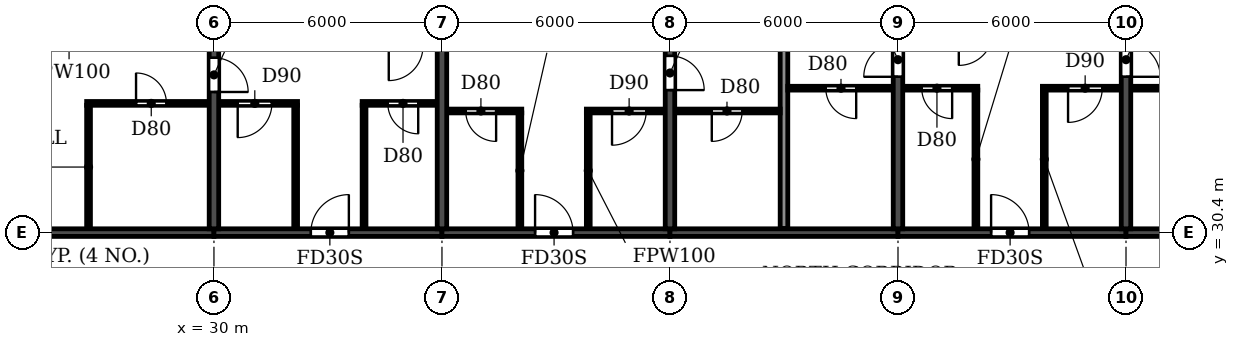
"""IFC4 building model, lengths in metres.
Left out: names, types, materials, properties, quantities, classifications, styles, units other than length and angle.
Written with IfcOpenShell. Run it as: python <this file> out.ifc"""

import sys

from ifc_helpers import new_model, si_unit, direction, frame, frame_2d, origin, place, context, subcontext, project, spatial, rectangle, extrude, element, fill, save


model = new_model("IFC4")
c1 = context("Model", 3, precision=1e-05, world=origin(), true_north=direction((0.0, 1.0)))
c2 = subcontext(c1, "Body", "Model", "MODEL_VIEW")
j1 = project(units=[si_unit("LENGTHUNIT", "METRE"), si_unit("PLANEANGLEUNIT", "RADIAN")], contexts=[c1])
p1 = place(None, origin())
s1 = spatial("IfcSite", under=j1, at=p1, CompositionType="ELEMENT")
p2 = place(p1, origin())
s2 = spatial("IfcBuilding", under=s1, at=p2, CompositionType="ELEMENT")
p3 = place(p2, frame((0.0, 0.0, 221.4)))
s3 = spatial("IfcBuildingStorey", under=s2, at=p3, CompositionType="ELEMENT", Elevation=221.4)
p4 = place(p3, frame((30.0, 30.5, 0.0), z_axis=(0.0, 0.0, 1.0), x_axis=(0.0, 1.0, 0.0)))
e1 = element("IfcWall", 1, at=p4, inside=s3, PredefinedType="SHEAR", context=c2, shape_type="SweptSolid", body=[
    extrude(rectangle(XDim=10.5, YDim=0.25, at=frame_2d((5.25, 0.0))), origin(), (0.0, 0.0, 1.0), 3.08),
])
p5 = place(p4, frame((3.6, 0.0, 0.0)))
e2 = element("IfcOpeningElement", 2, at=p5, cuts=e1, PredefinedType="OPENING", context=c2, shape_type="SweptSolid", body=[
    extrude(rectangle(XDim=0.9, YDim=2.1, at=frame_2d((0.45, 1.05))), frame((0.0, 0.135, 0.0), z_axis=(0.0, -1.0, 0.0), x_axis=(1.0, 0.0, 0.0)), (0.0, 0.0, 1.0), 0.27),
])
p6 = place(p3, frame((36.0, 30.5, 0.0), z_axis=(0.0, 0.0, 1.0), x_axis=(0.0, 1.0, 0.0)))
e3 = element("IfcWall", 3, at=p6, inside=s3, PredefinedType="SHEAR", context=c2, shape_type="SweptSolid", body=[
    extrude(rectangle(XDim=10.5, YDim=0.25, at=frame_2d((5.25, 0.0))), origin(), (0.0, 0.0, 1.0), 3.08),
])
p7 = place(p3, frame((42.0, 30.5, 0.0), z_axis=(0.0, 0.0, 1.0), x_axis=(0.0, 1.0, 0.0)))
e4 = element("IfcWall", 4, at=p7, inside=s3, PredefinedType="SHEAR", context=c2, shape_type="SweptSolid", body=[
    extrude(rectangle(XDim=10.5, YDim=0.25, at=frame_2d((5.25, 0.0))), origin(), (0.0, 0.0, 1.0), 3.08),
])
p8 = place(p7, frame((3.65, 0.0, 0.0)))
e5 = element("IfcOpeningElement", 5, at=p8, cuts=e4, PredefinedType="OPENING", context=c2, shape_type="SweptSolid", body=[
    extrude(rectangle(XDim=0.9, YDim=2.1, at=frame_2d((0.45, 1.05))), frame((0.0, 0.135, 0.0), z_axis=(0.0, -1.0, 0.0), x_axis=(1.0, 0.0, 0.0)), (0.0, 0.0, 1.0), 0.27),
])
p9 = place(p3, frame((48.0, 30.5, 0.0), z_axis=(0.0, 0.0, 1.0), x_axis=(0.0, 1.0, 0.0)))
e6 = element("IfcWall", 6, at=p9, inside=s3, PredefinedType="SHEAR", context=c2, shape_type="SweptSolid", body=[
    extrude(rectangle(XDim=10.5, YDim=0.25, at=frame_2d((5.25, 0.0))), origin(), (0.0, 0.0, 1.0), 3.08),
])
p10 = place(p9, frame((4.0, 0.0, 0.0)))
e7 = element("IfcOpeningElement", 7, at=p10, cuts=e6, PredefinedType="OPENING", context=c2, shape_type="SweptSolid", body=[
    extrude(rectangle(XDim=0.9, YDim=2.1, at=frame_2d((0.45, 1.05))), frame((0.0, 0.135, 0.0), z_axis=(0.0, -1.0, 0.0), x_axis=(1.0, 0.0, 0.0)), (0.0, 0.0, 1.0), 0.27),
])
p11 = place(p3, frame((54.0, 30.5, 0.0), z_axis=(0.0, 0.0, 1.0), x_axis=(0.0, 1.0, 0.0)))
e8 = element("IfcWall", 8, at=p11, inside=s3, PredefinedType="SHEAR", context=c2, shape_type="SweptSolid", body=[
    extrude(rectangle(XDim=10.5, YDim=0.25, at=frame_2d((5.25, 0.0))), origin(), (0.0, 0.0, 1.0), 3.08),
])
p12 = place(p11, frame((4.0, 0.0, 0.0)))
e9 = element("IfcOpeningElement", 9, at=p12, cuts=e8, PredefinedType="OPENING", context=c2, shape_type="SweptSolid", body=[
    extrude(rectangle(XDim=0.9, YDim=2.1, at=frame_2d((0.45, 1.05))), frame((0.0, 0.135, 0.0), z_axis=(0.0, -1.0, 0.0), x_axis=(1.0, 0.0, 0.0)), (0.0, 0.0, 1.0), 0.27),
])
p13 = place(p3, frame((24.0, 30.4, 0.0), z_axis=(0.0, 0.0, 1.0), x_axis=(1.0, 0.0, 0.0)))
e10 = element("IfcWall", 10, at=p13, inside=s3, PredefinedType="SHEAR", context=c2, shape_type="SweptSolid", body=[
    extrude(rectangle(XDim=6.0, YDim=0.2, at=frame_2d((3.0, 0.0))), origin(), (0.0, 0.0, 1.0), 2.48),
])
p14 = place(p3, frame((30.0, 30.4, 0.0), z_axis=(0.0, 0.0, 1.0), x_axis=(1.0, 0.0, 0.0)))
e11 = element("IfcWall", 11, at=p14, inside=s3, PredefinedType="SHEAR", context=c2, shape_type="SweptSolid", body=[
    extrude(rectangle(XDim=6.0, YDim=0.2, at=frame_2d((3.0, 0.0))), origin(), (0.0, 0.0, 1.0), 2.48),
])
p15 = place(p14, frame((2.55, 0.0, 0.0)))
e12 = element("IfcOpeningElement", 12, at=p15, cuts=e11, PredefinedType="OPENING", context=c2, shape_type="SweptSolid", body=[
    extrude(rectangle(XDim=1.0, YDim=2.1, at=frame_2d((0.5, 1.05))), frame((0.0, 0.11, 0.0), z_axis=(0.0, -1.0, 0.0), x_axis=(1.0, 0.0, 0.0)), (0.0, 0.0, 1.0), 0.22),
])
p16 = place(p3, frame((36.0, 30.4, 0.0), z_axis=(0.0, 0.0, 1.0), x_axis=(1.0, 0.0, 0.0)))
e13 = element("IfcWall", 13, at=p16, inside=s3, PredefinedType="SHEAR", context=c2, shape_type="SweptSolid", body=[
    extrude(rectangle(XDim=6.0, YDim=0.2, at=frame_2d((3.0, 0.0))), origin(), (0.0, 0.0, 1.0), 2.48),
])
p17 = place(p16, frame((2.45, 0.0, 0.0)))
e14 = element("IfcOpeningElement", 14, at=p17, cuts=e13, PredefinedType="OPENING", context=c2, shape_type="SweptSolid", body=[
    extrude(rectangle(XDim=1.0, YDim=2.1, at=frame_2d((0.5, 1.05))), frame((0.0, 0.11, 0.0), z_axis=(0.0, -1.0, 0.0), x_axis=(1.0, 0.0, 0.0)), (0.0, 0.0, 1.0), 0.22),
])
p18 = place(p3, frame((42.0, 30.4, 0.0), z_axis=(0.0, 0.0, 1.0), x_axis=(1.0, 0.0, 0.0)))
e15 = element("IfcWall", 15, at=p18, inside=s3, PredefinedType="SHEAR", context=c2, shape_type="SweptSolid", body=[
    extrude(rectangle(XDim=6.0, YDim=0.2, at=frame_2d((3.0, 0.0))), origin(), (0.0, 0.0, 1.0), 2.48),
])
p19 = place(p3, frame((48.0, 30.4, 0.0), z_axis=(0.0, 0.0, 1.0), x_axis=(1.0, 0.0, 0.0)))
e16 = element("IfcWall", 16, at=p19, inside=s3, PredefinedType="SHEAR", context=c2, shape_type="SweptSolid", body=[
    extrude(rectangle(XDim=6.0, YDim=0.2, at=frame_2d((3.0, 0.0))), origin(), (0.0, 0.0, 1.0), 2.48),
])
p20 = place(p19, frame((2.45, 0.0, 0.0)))
e17 = element("IfcOpeningElement", 17, at=p20, cuts=e16, PredefinedType="OPENING", context=c2, shape_type="SweptSolid", body=[
    extrude(rectangle(XDim=1.0, YDim=2.1, at=frame_2d((0.5, 1.05))), frame((0.0, 0.11, 0.0), z_axis=(0.0, -1.0, 0.0), x_axis=(1.0, 0.0, 0.0)), (0.0, 0.0, 1.0), 0.22),
])
p21 = place(p3, frame((54.0, 30.4, 0.0), z_axis=(0.0, 0.0, 1.0), x_axis=(1.0, 0.0, 0.0)))
e18 = element("IfcWall", 18, at=p21, inside=s3, PredefinedType="SHEAR", context=c2, shape_type="SweptSolid", body=[
    extrude(rectangle(XDim=6.0, YDim=0.2, at=frame_2d((3.0, 0.0))), origin(), (0.0, 0.0, 1.0), 2.48),
])
p22 = place(p3, frame((45.0, 30.51, 0.0), z_axis=(0.0, 0.0, 1.0), x_axis=(0.0, 1.0, 0.0)))
e19 = element("IfcWall", 19, at=p22, inside=s3, PredefinedType="PARTITIONING", context=c2, shape_type="SweptSolid", body=[
    extrude(rectangle(XDim=10.63, YDim=0.2, at=frame_2d((5.315, 0.0))), origin(), (0.0, 0.0, 1.0), 3.08),
])
p23 = place(p3, frame((36.135, 33.6, 0.0), z_axis=(0.0, 0.0, 1.0), x_axis=(1.0, 0.0, 0.0)))
e20 = element("IfcWall", 20, at=p23, inside=s3, PredefinedType="PARTITIONING", context=c2, shape_type="SweptSolid", body=[
    extrude(rectangle(XDim=1.965, YDim=0.1, at=frame_2d((0.982, 0.0))), origin(), (0.0, 0.0, 1.0), 3.08),
])
p24 = place(p23, frame((0.49, 0.0, 0.0)))
e21 = element("IfcOpeningElement", 21, at=p24, cuts=e20, PredefinedType="OPENING", context=c2, shape_type="SweptSolid", body=[
    extrude(rectangle(XDim=0.8, YDim=2.1, at=frame_2d((0.4, 1.05))), frame((0.0, 0.06, 0.0), z_axis=(0.0, -1.0, 0.0), x_axis=(1.0, 0.0, 0.0)), (0.0, 0.0, 1.0), 0.12),
])
p25 = place(p3, frame((39.8, 33.6, 0.0), z_axis=(0.0, 0.0, 1.0), x_axis=(1.0, 0.0, 0.0)))
e22 = element("IfcWall", 22, at=p25, inside=s3, PredefinedType="PARTITIONING", context=c2, shape_type="SweptSolid", body=[
    extrude(rectangle(XDim=2.065, YDim=0.1, at=frame_2d((1.032, 0.0))), origin(), (0.0, 0.0, 1.0), 3.08),
])
p26 = place(p25, frame((0.675, 0.0, 0.0)))
e23 = element("IfcOpeningElement", 23, at=p26, cuts=e22, PredefinedType="OPENING", context=c2, shape_type="SweptSolid", body=[
    extrude(rectangle(XDim=0.9, YDim=2.1, at=frame_2d((0.45, 1.05))), frame((0.0, 0.06, 0.0), z_axis=(0.0, -1.0, 0.0), x_axis=(1.0, 0.0, 0.0)), (0.0, 0.0, 1.0), 0.12),
])
p27 = place(p3, frame((42.135, 33.6, 0.0), z_axis=(0.0, 0.0, 1.0), x_axis=(1.0, 0.0, 0.0)))
e24 = element("IfcWall", 24, at=p27, inside=s3, PredefinedType="PARTITIONING", context=c2, shape_type="SweptSolid", body=[
    extrude(rectangle(XDim=2.765, YDim=0.1, at=frame_2d((1.382, 0.0))), origin(), (0.0, 0.0, 1.0), 3.08),
])
p28 = place(p27, frame((0.965, 0.0, 0.0)))
e25 = element("IfcOpeningElement", 25, at=p28, cuts=e24, PredefinedType="OPENING", context=c2, shape_type="SweptSolid", body=[
    extrude(rectangle(XDim=0.8, YDim=2.1, at=frame_2d((0.4, 1.05))), frame((0.0, 0.06, 0.0), z_axis=(0.0, -1.0, 0.0), x_axis=(1.0, 0.0, 0.0)), (0.0, 0.0, 1.0), 0.12),
])
p29 = place(p3, frame((26.65, 33.8, 0.0), z_axis=(0.0, 0.0, 1.0), x_axis=(1.0, 0.0, 0.0)))
e26 = element("IfcWall", 26, at=p29, inside=s3, PredefinedType="PARTITIONING", context=c2, shape_type="SweptSolid", body=[
    extrude(rectangle(XDim=3.215, YDim=0.1, at=frame_2d((1.607, 0.0))), origin(), (0.0, 0.0, 1.0), 3.08),
])
p30 = place(p29, frame((1.3, 0.0, 0.0)))
e27 = element("IfcOpeningElement", 27, at=p30, cuts=e26, PredefinedType="OPENING", context=c2, shape_type="SweptSolid", body=[
    extrude(rectangle(XDim=0.8, YDim=2.1, at=frame_2d((0.4, 1.05))), frame((0.0, 0.06, 0.0), z_axis=(0.0, -1.0, 0.0), x_axis=(1.0, 0.0, 0.0)), (0.0, 0.0, 1.0), 0.12),
])
p31 = place(p3, frame((30.135, 33.8, 0.0), z_axis=(0.0, 0.0, 1.0), x_axis=(1.0, 0.0, 0.0)))
e28 = element("IfcWall", 28, at=p31, inside=s3, PredefinedType="PARTITIONING", context=c2, shape_type="SweptSolid", body=[
    extrude(rectangle(XDim=2.065, YDim=0.1, at=frame_2d((1.032, 0.0))), origin(), (0.0, 0.0, 1.0), 3.08),
])
p32 = place(p31, frame((0.49, 0.0, 0.0)))
e29 = element("IfcOpeningElement", 29, at=p32, cuts=e28, PredefinedType="OPENING", context=c2, shape_type="SweptSolid", body=[
    extrude(rectangle(XDim=0.9, YDim=2.1, at=frame_2d((0.45, 1.05))), frame((0.0, 0.06, 0.0), z_axis=(0.0, -1.0, 0.0), x_axis=(1.0, 0.0, 0.0)), (0.0, 0.0, 1.0), 0.12),
])
p33 = place(p3, frame((33.9, 33.8, 0.0), z_axis=(0.0, 0.0, 1.0), x_axis=(1.0, 0.0, 0.0)))
e30 = element("IfcWall", 30, at=p33, inside=s3, PredefinedType="PARTITIONING", context=c2, shape_type="SweptSolid", body=[
    extrude(rectangle(XDim=1.965, YDim=0.1, at=frame_2d((0.982, 0.0))), origin(), (0.0, 0.0, 1.0), 3.08),
])
p34 = place(p33, frame((0.675, 0.0, 0.0)))
e31 = element("IfcOpeningElement", 31, at=p34, cuts=e30, PredefinedType="OPENING", context=c2, shape_type="SweptSolid", body=[
    extrude(rectangle(XDim=0.8, YDim=2.1, at=frame_2d((0.4, 1.05))), frame((0.0, 0.06, 0.0), z_axis=(0.0, -1.0, 0.0), x_axis=(1.0, 0.0, 0.0)), (0.0, 0.0, 1.0), 0.12),
])
p35 = place(p3, frame((45.1, 34.2, 0.0), z_axis=(0.0, 0.0, 1.0), x_axis=(1.0, 0.0, 0.0)))
e32 = element("IfcWall", 32, at=p35, inside=s3, PredefinedType="PARTITIONING", context=c2, shape_type="SweptSolid", body=[
    extrude(rectangle(XDim=2.765, YDim=0.1, at=frame_2d((1.382, 0.0))), origin(), (0.0, 0.0, 1.0), 3.08),
])
p36 = place(p35, frame((1.0, 0.0, 0.0)))
e33 = element("IfcOpeningElement", 33, at=p36, cuts=e32, PredefinedType="OPENING", context=c2, shape_type="SweptSolid", body=[
    extrude(rectangle(XDim=0.8, YDim=2.1, at=frame_2d((0.4, 1.05))), frame((0.0, 0.06, 0.0), z_axis=(0.0, -1.0, 0.0), x_axis=(1.0, 0.0, 0.0)), (0.0, 0.0, 1.0), 0.12),
])
p37 = place(p3, frame((48.135, 34.2, 0.0), z_axis=(0.0, 0.0, 1.0), x_axis=(1.0, 0.0, 0.0)))
e34 = element("IfcWall", 34, at=p37, inside=s3, PredefinedType="PARTITIONING", context=c2, shape_type="SweptSolid", body=[
    extrude(rectangle(XDim=1.965, YDim=0.1, at=frame_2d((0.982, 0.0))), origin(), (0.0, 0.0, 1.0), 3.08),
])
p38 = place(p37, frame((0.49, 0.0, 0.0)))
e35 = element("IfcOpeningElement", 35, at=p38, cuts=e34, PredefinedType="OPENING", context=c2, shape_type="SweptSolid", body=[
    extrude(rectangle(XDim=0.8, YDim=2.1, at=frame_2d((0.4, 1.05))), frame((0.0, 0.06, 0.0), z_axis=(0.0, -1.0, 0.0), x_axis=(1.0, 0.0, 0.0)), (0.0, 0.0, 1.0), 0.12),
])
p39 = place(p3, frame((51.8, 34.2, 0.0), z_axis=(0.0, 0.0, 1.0), x_axis=(1.0, 0.0, 0.0)))
e36 = element("IfcWall", 36, at=p39, inside=s3, PredefinedType="PARTITIONING", context=c2, shape_type="SweptSolid", body=[
    extrude(rectangle(XDim=2.065, YDim=0.1, at=frame_2d((1.032, 0.0))), origin(), (0.0, 0.0, 1.0), 3.08),
])
p40 = place(p39, frame((0.675, 0.0, 0.0)))
e37 = element("IfcOpeningElement", 37, at=p40, cuts=e36, PredefinedType="OPENING", context=c2, shape_type="SweptSolid", body=[
    extrude(rectangle(XDim=0.9, YDim=2.1, at=frame_2d((0.45, 1.05))), frame((0.0, 0.06, 0.0), z_axis=(0.0, -1.0, 0.0), x_axis=(1.0, 0.0, 0.0)), (0.0, 0.0, 1.0), 0.12),
])
p41 = place(p3, frame((54.135, 34.2, 0.0), z_axis=(0.0, 0.0, 1.0), x_axis=(1.0, 0.0, 0.0)))
e38 = element("IfcWall", 38, at=p41, inside=s3, PredefinedType="PARTITIONING", context=c2, shape_type="SweptSolid", body=[
    extrude(rectangle(XDim=2.765, YDim=0.1, at=frame_2d((1.382, 0.0))), origin(), (0.0, 0.0, 1.0), 3.08),
])
p42 = place(p41, frame((0.965, 0.0, 0.0)))
e39 = element("IfcOpeningElement", 39, at=p42, cuts=e38, PredefinedType="OPENING", context=c2, shape_type="SweptSolid", body=[
    extrude(rectangle(XDim=0.8, YDim=2.1, at=frame_2d((0.4, 1.05))), frame((0.0, 0.06, 0.0), z_axis=(0.0, -1.0, 0.0), x_axis=(1.0, 0.0, 0.0)), (0.0, 0.0, 1.0), 0.12),
])
for number, where, z_axis, x_axis in (
    (40, (26.7, 30.51, 0.0), (0.0, 0.0, 1.0), (0.0, 1.0, 0.0)),
    (41, (32.15, 30.51, 0.0), (0.0, 0.0, 1.0), (0.0, 1.0, 0.0)),
    (42, (33.95, 30.51, 0.0), (0.0, 0.0, 1.0), (0.0, 1.0, 0.0)),
):
    element("IfcWall", number, at=place(p3, frame(where, z_axis=z_axis, x_axis=x_axis)), inside=s3, PredefinedType="PARTITIONING", context=c2, shape_type="SweptSolid", body=[
        extrude(rectangle(XDim=3.24, YDim=0.1, at=frame_2d((1.62, 0.0))), origin(), (0.0, 0.0, 1.0), 3.08),
    ])
for number, where, z_axis, x_axis in (
    (43, (38.05, 30.51, 0.0), (0.0, 0.0, 1.0), (0.0, 1.0, 0.0)),
    (44, (39.85, 30.51, 0.0), (0.0, 0.0, 1.0), (0.0, 1.0, 0.0)),
):
    element("IfcWall", number, at=place(p3, frame(where, z_axis=z_axis, x_axis=x_axis)), inside=s3, PredefinedType="PARTITIONING", context=c2, shape_type="SweptSolid", body=[
        extrude(rectangle(XDim=3.04, YDim=0.1, at=frame_2d((1.52, 0.0))), origin(), (0.0, 0.0, 1.0), 3.08),
    ])
for number, where, z_axis, x_axis in (
    (45, (50.05, 30.51, 0.0), (0.0, 0.0, 1.0), (0.0, 1.0, 0.0)),
    (46, (51.85, 30.51, 0.0), (0.0, 0.0, 1.0), (0.0, 1.0, 0.0)),
):
    element("IfcWall", number, at=place(p3, frame(where, z_axis=z_axis, x_axis=x_axis)), inside=s3, PredefinedType="PARTITIONING", context=c2, shape_type="SweptSolid", body=[
        extrude(rectangle(XDim=3.64, YDim=0.1, at=frame_2d((1.82, 0.0))), origin(), (0.0, 0.0, 1.0), 3.08),
    ])
p43 = place(p30, origin())
e47 = element("IfcDoor", 47, at=p43, inside=s3, OperationType="SINGLE_SWING_LEFT", PredefinedType="DOOR", context=c2, shape_type="SweptSolid", body=[
    extrude(rectangle(XDim=0.8, YDim=2.1, at=frame_2d((0.4, 1.05))), frame((0.0, 0.025, 0.0), z_axis=(0.0, -1.0, 0.0), x_axis=(1.0, 0.0, 0.0)), (0.0, 0.0, 1.0), 0.05),
])
fill(e27, e47)
p44 = place(p5, frame((0.9, 0.0, 0.0), z_axis=(0.0, 0.0, 1.0), x_axis=(-1.0, 0.0, 0.0)))
e48 = element("IfcDoor", 48, at=p44, inside=s3, OperationType="SINGLE_SWING_RIGHT", PredefinedType="DOOR", context=c2, shape_type="SweptSolid", body=[
    extrude(rectangle(XDim=0.9, YDim=2.1, at=frame_2d((0.45, 1.05))), frame((0.0, 0.025, 0.0), z_axis=(0.0, -1.0, 0.0), x_axis=(1.0, 0.0, 0.0)), (0.0, 0.0, 1.0), 0.05),
])
fill(e2, e48)
p45 = place(p32, frame((0.9, 0.0, 0.0), z_axis=(0.0, 0.0, 1.0), x_axis=(-1.0, 0.0, 0.0)))
e49 = element("IfcDoor", 49, at=p45, inside=s3, OperationType="SINGLE_SWING_RIGHT", PredefinedType="DOOR", context=c2, shape_type="SweptSolid", body=[
    extrude(rectangle(XDim=0.9, YDim=2.1, at=frame_2d((0.45, 1.05))), frame((0.0, 0.025, 0.0), z_axis=(0.0, -1.0, 0.0), x_axis=(1.0, 0.0, 0.0)), (0.0, 0.0, 1.0), 0.05),
])
fill(e29, e49)
p46 = place(p15, origin())
e50 = element("IfcDoor", 50, at=p46, inside=s3, OperationType="SINGLE_SWING_RIGHT", PredefinedType="DOOR", context=c2, shape_type="SweptSolid", body=[
    extrude(rectangle(XDim=1.0, YDim=2.1, at=frame_2d((0.5, 1.05))), frame((0.0, 0.025, 0.0), z_axis=(0.0, -1.0, 0.0), x_axis=(1.0, 0.0, 0.0)), (0.0, 0.0, 1.0), 0.05),
])
fill(e12, e50)
p47 = place(p34, frame((0.8, 0.0, 0.0), z_axis=(0.0, 0.0, 1.0), x_axis=(-1.0, 0.0, 0.0)))
e51 = element("IfcDoor", 51, at=p47, inside=s3, OperationType="SINGLE_SWING_LEFT", PredefinedType="DOOR", context=c2, shape_type="SweptSolid", body=[
    extrude(rectangle(XDim=0.8, YDim=2.1, at=frame_2d((0.4, 1.05))), frame((0.0, 0.025, 0.0), z_axis=(0.0, -1.0, 0.0), x_axis=(1.0, 0.0, 0.0)), (0.0, 0.0, 1.0), 0.05),
])
fill(e31, e51)
p48 = place(p28, frame((0.8, 0.0, 0.0), z_axis=(0.0, 0.0, 1.0), x_axis=(-1.0, 0.0, 0.0)))
e52 = element("IfcDoor", 52, at=p48, inside=s3, OperationType="SINGLE_SWING_RIGHT", PredefinedType="DOOR", context=c2, shape_type="SweptSolid", body=[
    extrude(rectangle(XDim=0.8, YDim=2.1, at=frame_2d((0.4, 1.05))), frame((0.0, 0.025, 0.0), z_axis=(0.0, -1.0, 0.0), x_axis=(1.0, 0.0, 0.0)), (0.0, 0.0, 1.0), 0.05),
])
fill(e25, e52)
p49 = place(p24, frame((0.8, 0.0, 0.0), z_axis=(0.0, 0.0, 1.0), x_axis=(-1.0, 0.0, 0.0)))
e53 = element("IfcDoor", 53, at=p49, inside=s3, OperationType="SINGLE_SWING_LEFT", PredefinedType="DOOR", context=c2, shape_type="SweptSolid", body=[
    extrude(rectangle(XDim=0.8, YDim=2.1, at=frame_2d((0.4, 1.05))), frame((0.0, 0.025, 0.0), z_axis=(0.0, -1.0, 0.0), x_axis=(1.0, 0.0, 0.0)), (0.0, 0.0, 1.0), 0.05),
])
fill(e21, e53)
p50 = place(p17, origin())
e54 = element("IfcDoor", 54, at=p50, inside=s3, OperationType="SINGLE_SWING_LEFT", PredefinedType="DOOR", context=c2, shape_type="SweptSolid", body=[
    extrude(rectangle(XDim=1.0, YDim=2.1, at=frame_2d((0.5, 1.05))), frame((0.0, 0.025, 0.0), z_axis=(0.0, -1.0, 0.0), x_axis=(1.0, 0.0, 0.0)), (0.0, 0.0, 1.0), 0.05),
])
fill(e14, e54)
p51 = place(p26, frame((0.9, 0.0, 0.0), z_axis=(0.0, 0.0, 1.0), x_axis=(-1.0, 0.0, 0.0)))
e55 = element("IfcDoor", 55, at=p51, inside=s3, OperationType="SINGLE_SWING_RIGHT", PredefinedType="DOOR", context=c2, shape_type="SweptSolid", body=[
    extrude(rectangle(XDim=0.9, YDim=2.1, at=frame_2d((0.45, 1.05))), frame((0.0, 0.025, 0.0), z_axis=(0.0, -1.0, 0.0), x_axis=(1.0, 0.0, 0.0)), (0.0, 0.0, 1.0), 0.05),
])
fill(e23, e55)
p52 = place(p8, frame((0.9, 0.0, 0.0), z_axis=(0.0, 0.0, 1.0), x_axis=(-1.0, 0.0, 0.0)))
e56 = element("IfcDoor", 56, at=p52, inside=s3, OperationType="SINGLE_SWING_RIGHT", PredefinedType="DOOR", context=c2, shape_type="SweptSolid", body=[
    extrude(rectangle(XDim=0.9, YDim=2.1, at=frame_2d((0.45, 1.05))), frame((0.0, 0.025, 0.0), z_axis=(0.0, -1.0, 0.0), x_axis=(1.0, 0.0, 0.0)), (0.0, 0.0, 1.0), 0.05),
])
fill(e5, e56)
p53 = place(p36, frame((0.8, 0.0, 0.0), z_axis=(0.0, 0.0, 1.0), x_axis=(-1.0, 0.0, 0.0)))
e57 = element("IfcDoor", 57, at=p53, inside=s3, OperationType="SINGLE_SWING_LEFT", PredefinedType="DOOR", context=c2, shape_type="SweptSolid", body=[
    extrude(rectangle(XDim=0.8, YDim=2.1, at=frame_2d((0.4, 1.05))), frame((0.0, 0.025, 0.0), z_axis=(0.0, -1.0, 0.0), x_axis=(1.0, 0.0, 0.0)), (0.0, 0.0, 1.0), 0.05),
])
fill(e33, e57)
p54 = place(p10, origin())
e58 = element("IfcDoor", 58, at=p54, inside=s3, OperationType="SINGLE_SWING_LEFT", PredefinedType="DOOR", context=c2, shape_type="SweptSolid", body=[
    extrude(rectangle(XDim=0.9, YDim=2.1, at=frame_2d((0.45, 1.05))), frame((0.0, 0.025, 0.0), z_axis=(0.0, -1.0, 0.0), x_axis=(1.0, 0.0, 0.0)), (0.0, 0.0, 1.0), 0.05),
])
fill(e7, e58)
p55 = place(p38, frame((0.8, 0.0, 0.0), z_axis=(0.0, 0.0, 1.0), x_axis=(-1.0, 0.0, 0.0)))
e59 = element("IfcDoor", 59, at=p55, inside=s3, OperationType="SINGLE_SWING_LEFT", PredefinedType="DOOR", context=c2, shape_type="SweptSolid", body=[
    extrude(rectangle(XDim=0.8, YDim=2.1, at=frame_2d((0.4, 1.05))), frame((0.0, 0.025, 0.0), z_axis=(0.0, -1.0, 0.0), x_axis=(1.0, 0.0, 0.0)), (0.0, 0.0, 1.0), 0.05),
])
fill(e35, e59)
p56 = place(p20, origin())
e60 = element("IfcDoor", 60, at=p56, inside=s3, OperationType="SINGLE_SWING_LEFT", PredefinedType="DOOR", context=c2, shape_type="SweptSolid", body=[
    extrude(rectangle(XDim=1.0, YDim=2.1, at=frame_2d((0.5, 1.05))), frame((0.0, 0.025, 0.0), z_axis=(0.0, -1.0, 0.0), x_axis=(1.0, 0.0, 0.0)), (0.0, 0.0, 1.0), 0.05),
])
fill(e17, e60)
p57 = place(p40, frame((0.9, 0.0, 0.0), z_axis=(0.0, 0.0, 1.0), x_axis=(-1.0, 0.0, 0.0)))
e61 = element("IfcDoor", 61, at=p57, inside=s3, OperationType="SINGLE_SWING_RIGHT", PredefinedType="DOOR", context=c2, shape_type="SweptSolid", body=[
    extrude(rectangle(XDim=0.9, YDim=2.1, at=frame_2d((0.45, 1.05))), frame((0.0, 0.025, 0.0), z_axis=(0.0, -1.0, 0.0), x_axis=(1.0, 0.0, 0.0)), (0.0, 0.0, 1.0), 0.05),
])
fill(e37, e61)
p58 = place(p12, frame((0.9, 0.0, 0.0), z_axis=(0.0, 0.0, 1.0), x_axis=(-1.0, 0.0, 0.0)))
e62 = element("IfcDoor", 62, at=p58, inside=s3, OperationType="SINGLE_SWING_RIGHT", PredefinedType="DOOR", context=c2, shape_type="SweptSolid", body=[
    extrude(rectangle(XDim=0.9, YDim=2.1, at=frame_2d((0.45, 1.05))), frame((0.0, 0.025, 0.0), z_axis=(0.0, -1.0, 0.0), x_axis=(1.0, 0.0, 0.0)), (0.0, 0.0, 1.0), 0.05),
])
fill(e9, e62)
save(model, sys.argv[1])
